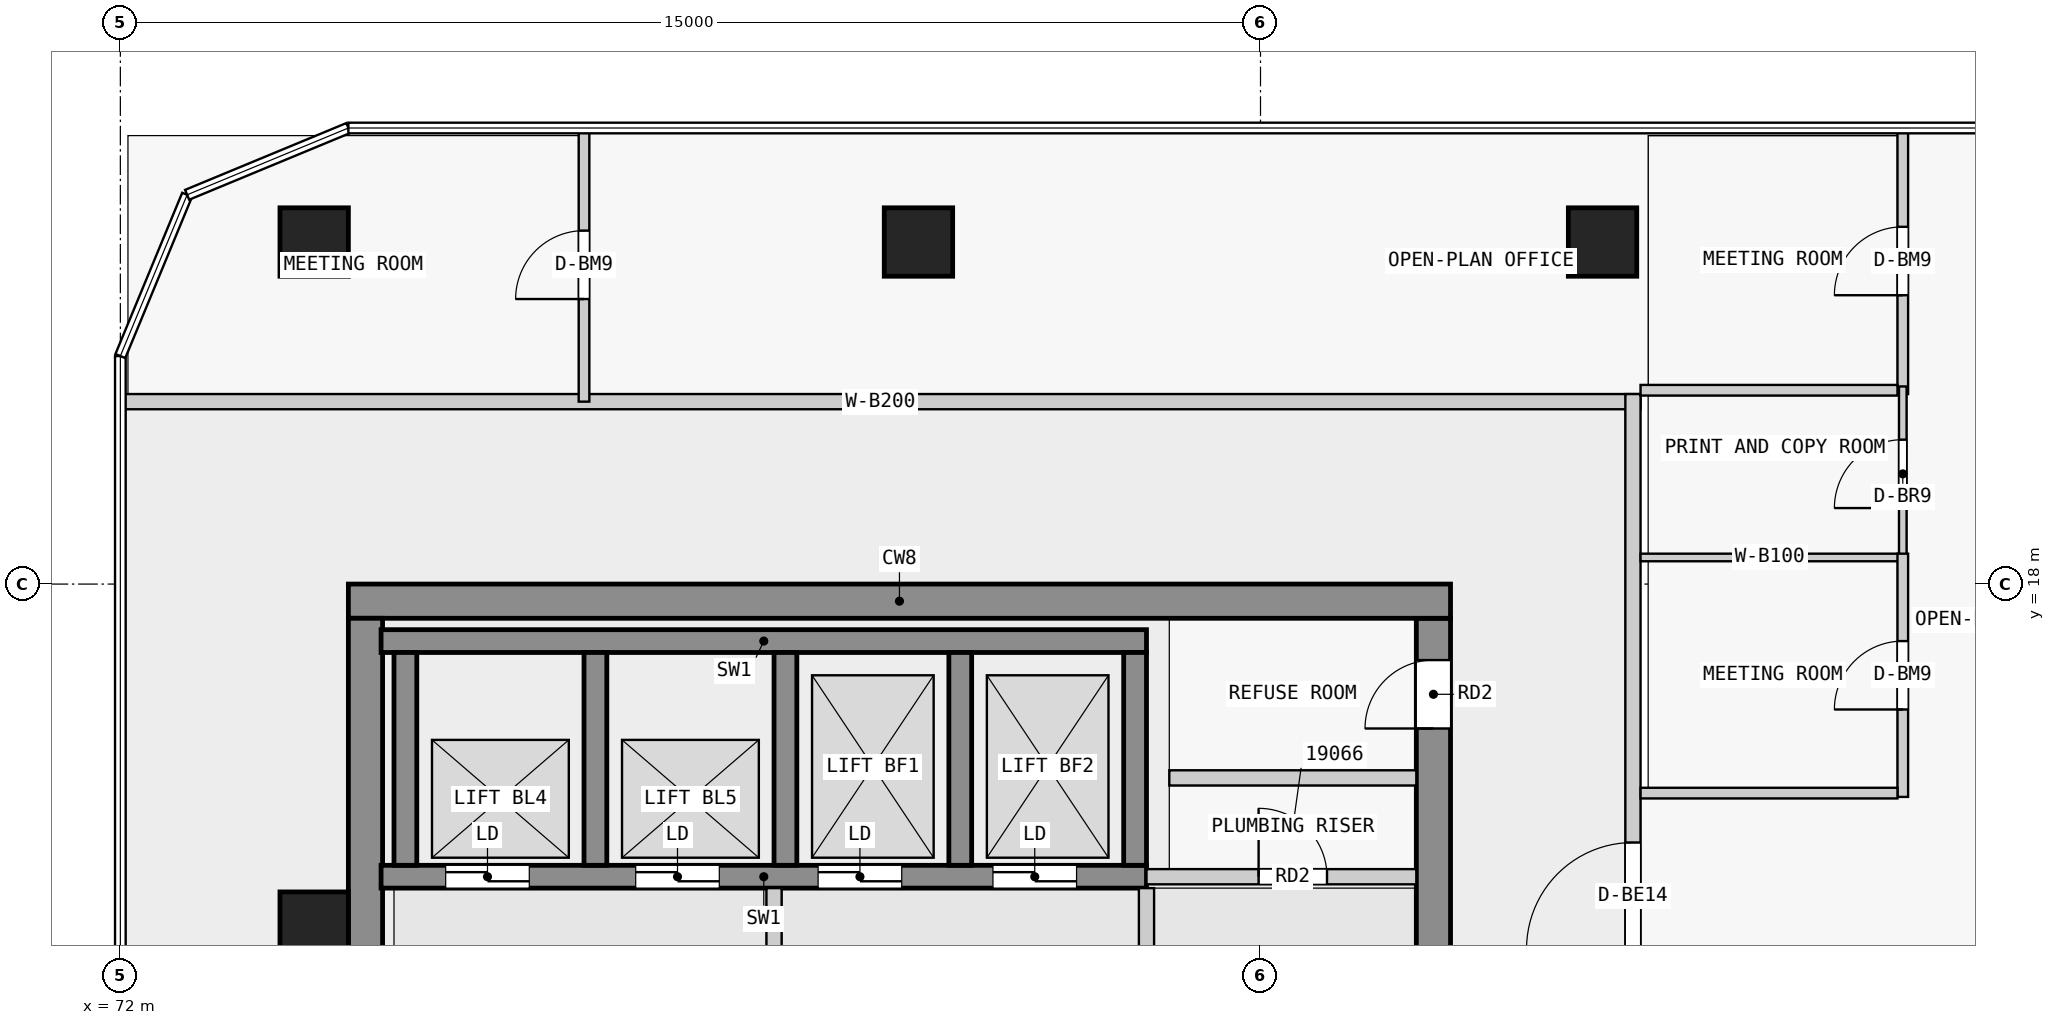
"""IFC4 building model, lengths in metres.
Left out: names, types, materials, properties, quantities, classifications, styles, units other than length and angle.
Written with IfcOpenShell. Run it as: python <this file> out.ifc"""

import sys

from ifc_helpers import new_model, si_unit, direction, frame, frame_2d, origin, origin_2d, place, context, subcontext, project, spatial, rectangle, extrude, element, fill, save


model = new_model("IFC4")
c1 = context("Model", 3, precision=1e-05, world=origin(), true_north=direction((0.0, 1.0)))
c2 = subcontext(c1, "Body", "Model", "MODEL_VIEW")
j1 = project(units=[si_unit("LENGTHUNIT", "METRE"), si_unit("PLANEANGLEUNIT", "RADIAN")], contexts=[c1])
p1 = place(None, origin())
s1 = spatial("IfcSite", under=j1, at=p1, CompositionType="ELEMENT")
p2 = place(p1, origin())
s2 = spatial("IfcBuilding", under=s1, at=p2, CompositionType="ELEMENT")
p3 = place(p2, frame((0.0, 0.0, 78.3)))
s3 = spatial("IfcBuildingStorey", under=s2, at=p3, CompositionType="ELEMENT", Elevation=78.3)
for number, where, z_axis, x_axis in (
    (1, (91.5, 22.5, 0.0), (0.0, 0.0, 1.0), (1.0, 0.0, 0.0)),
    (2, (82.5, 22.5, 0.0), (0.0, 0.0, 1.0), (1.0, 0.0, 0.0)),
    (3, (74.55, 22.5, 0.0), (0.0, 0.0, 1.0), (1.0, 0.0, 0.0)),
    (4, (74.55, 13.5, 0.0), (0.0, 0.0, 1.0), (1.0, 0.0, 0.0)),
):
    element("IfcColumn", number, at=place(p3, frame(where, z_axis=z_axis, x_axis=x_axis)), inside=s3, PredefinedType="COLUMN", context=c2, shape_type="SweptSolid", body=[
        extrude(rectangle(XDim=0.9, YDim=0.9, at=origin_2d()), origin(), (0.0, 0.0, 1.0), 3.5),
    ])
p4 = place(p3, frame((75.0, 17.775, 0.0), z_axis=(0.0, 0.0, 1.0), x_axis=(1.0, 0.0, 0.0)))
e5 = element("IfcWall", 5, at=p4, inside=s3, PredefinedType="SHEAR", context=c2, shape_type="SweptSolid", body=[
    extrude(rectangle(XDim=14.5, YDim=0.45, at=frame_2d((7.25, 0.0))), origin(), (0.0, 0.0, 1.0), 3.25),
])
p5 = place(p3, frame((75.225, 0.45, 0.0), z_axis=(0.0, 0.0, 1.0), x_axis=(0.0, 1.0, 0.0)))
e6 = element("IfcWall", 6, at=p5, inside=s3, PredefinedType="SHEAR", context=c2, shape_type="SweptSolid", body=[
    extrude(rectangle(XDim=17.1, YDim=0.45, at=frame_2d((8.55, 0.0))), origin(), (0.0, 0.0, 1.0), 3.25),
])
p6 = place(p5, frame((7.875, 0.0, 0.0)))
e7 = element("IfcOpeningElement", 7, at=p6, cuts=e6, PredefinedType="OPENING", context=c2, shape_type="SweptSolid", body=[
    extrude(rectangle(XDim=1.8, YDim=2.1, at=frame_2d((0.9, 1.05))), frame((0.0, 0.235, 0.0), z_axis=(0.0, -1.0, 0.0), x_axis=(1.0, 0.0, 0.0)), (0.0, 0.0, 1.0), 0.47),
])
p7 = place(p3, frame((89.275, 0.45, 0.0), z_axis=(0.0, 0.0, 1.0), x_axis=(0.0, 1.0, 0.0)))
e8 = element("IfcWall", 8, at=p7, inside=s3, PredefinedType="SHEAR", context=c2, shape_type="SweptSolid", body=[
    extrude(rectangle(XDim=17.1, YDim=0.45, at=frame_2d((8.55, 0.0))), origin(), (0.0, 0.0, 1.0), 3.25),
])
p8 = place(p7, frame((7.65, 0.0, 0.0)))
e9 = element("IfcOpeningElement", 9, at=p8, cuts=e8, PredefinedType="OPENING", context=c2, shape_type="SweptSolid", body=[
    extrude(rectangle(XDim=1.8, YDim=2.1, at=frame_2d((0.9, 1.05))), frame((0.0, 0.235, 0.0), z_axis=(0.0, -1.0, 0.0), x_axis=(1.0, 0.0, 0.0)), (0.0, 0.0, 1.0), 0.47),
])
p9 = place(p7, frame((15.65, 0.0, 0.0)))
e10 = element("IfcOpeningElement", 10, at=p9, cuts=e8, PredefinedType="OPENING", context=c2, shape_type="SweptSolid", body=[
    extrude(rectangle(XDim=0.9, YDim=2.1, at=frame_2d((0.45, 1.05))), frame((0.0, 0.235, 0.0), z_axis=(0.0, -1.0, 0.0), x_axis=(1.0, 0.0, 0.0)), (0.0, 0.0, 1.0), 0.47),
])
p10 = place(p3, frame((75.43, 17.25, 0.0), z_axis=(0.0, 0.0, 1.0), x_axis=(1.0, 0.0, 0.0)))
e11 = element("IfcWall", 11, at=p10, inside=s3, PredefinedType="SHEAR", context=c2, shape_type="SweptSolid", body=[
    extrude(rectangle(XDim=10.07, YDim=0.3, at=frame_2d((5.035, 0.0))), origin(), (0.0, 0.0, 1.0), 3.25),
])
p11 = place(p3, frame((75.43, 14.15, 0.0), z_axis=(0.0, 0.0, 1.0), x_axis=(1.0, 0.0, 0.0)))
e12 = element("IfcWall", 12, at=p11, inside=s3, PredefinedType="SHEAR", context=c2, shape_type="SweptSolid", body=[
    extrude(rectangle(XDim=10.07, YDim=0.3, at=frame_2d((5.035, 0.0))), origin(), (0.0, 0.0, 1.0), 3.25),
])
p12 = place(p11, frame((0.85, 0.0, 0.0)))
e13 = element("IfcOpeningElement", 13, at=p12, cuts=e12, PredefinedType="OPENING", context=c2, shape_type="SweptSolid", body=[
    extrude(rectangle(XDim=1.1, YDim=2.1, at=frame_2d((0.55, 1.05))), frame((0.0, 0.16, 0.0), z_axis=(0.0, -1.0, 0.0), x_axis=(1.0, 0.0, 0.0)), (0.0, 0.0, 1.0), 0.32),
])
p13 = place(p11, frame((3.35, 0.0, 0.0)))
e14 = element("IfcOpeningElement", 14, at=p13, cuts=e12, PredefinedType="OPENING", context=c2, shape_type="SweptSolid", body=[
    extrude(rectangle(XDim=1.1, YDim=2.1, at=frame_2d((0.55, 1.05))), frame((0.0, 0.16, 0.0), z_axis=(0.0, -1.0, 0.0), x_axis=(1.0, 0.0, 0.0)), (0.0, 0.0, 1.0), 0.32),
])
p14 = place(p11, frame((5.75, 0.0, 0.0)))
e15 = element("IfcOpeningElement", 15, at=p14, cuts=e12, PredefinedType="OPENING", context=c2, shape_type="SweptSolid", body=[
    extrude(rectangle(XDim=1.1, YDim=2.1, at=frame_2d((0.55, 1.05))), frame((0.0, 0.16, 0.0), z_axis=(0.0, -1.0, 0.0), x_axis=(1.0, 0.0, 0.0)), (0.0, 0.0, 1.0), 0.32),
])
p15 = place(p11, frame((8.05, 0.0, 0.0)))
e16 = element("IfcOpeningElement", 16, at=p15, cuts=e12, PredefinedType="OPENING", context=c2, shape_type="SweptSolid", body=[
    extrude(rectangle(XDim=1.1, YDim=2.1, at=frame_2d((0.55, 1.05))), frame((0.0, 0.16, 0.0), z_axis=(0.0, -1.0, 0.0), x_axis=(1.0, 0.0, 0.0)), (0.0, 0.0, 1.0), 0.32),
])
for number, where, z_axis, x_axis in (
    (17, (75.75, 14.3, 0.0), (0.0, 0.0, 1.0), (0.0, 1.0, 0.0)),
    (18, (78.25, 14.3, 0.0), (0.0, 0.0, 1.0), (0.0, 1.0, 0.0)),
    (19, (80.75, 14.3, 0.0), (0.0, 0.0, 1.0), (0.0, 1.0, 0.0)),
    (20, (83.05, 14.3, 0.0), (0.0, 0.0, 1.0), (0.0, 1.0, 0.0)),
    (21, (85.35, 14.3, 0.0), (0.0, 0.0, 1.0), (0.0, 1.0, 0.0)),
):
    element("IfcWall", number, at=place(p3, frame(where, z_axis=z_axis, x_axis=x_axis)), inside=s3, PredefinedType="SHEAR", context=c2, shape_type="SweptSolid", body=[
        extrude(rectangle(XDim=2.8, YDim=0.3, at=frame_2d((1.4, 0.0))), origin(), (0.0, 0.0, 1.0), 3.25),
    ])
for number, where, z_axis, x_axis in (
    (22, (80.6, 10.6, 0.0), (0.0, 0.0, 1.0), (0.0, 1.0, 0.0)),
    (23, (85.5, 10.6, 0.0), (0.0, 0.0, 1.0), (0.0, 1.0, 0.0)),
):
    element("IfcWall", number, at=place(p3, frame(where, z_axis=z_axis, x_axis=x_axis)), inside=s3, PredefinedType="PARTITIONING", context=c2, shape_type="SweptSolid", body=[
        extrude(rectangle(XDim=3.4, YDim=0.2, at=frame_2d((1.7, 0.0))), origin(), (0.0, 0.0, 1.0), 3.25),
    ])
p16 = place(p3, frame((85.5, 14.15, 0.0), z_axis=(0.0, 0.0, 1.0), x_axis=(1.0, 0.0, 0.0)))
e24 = element("IfcWall", 24, at=p16, inside=s3, PredefinedType="PARTITIONING", context=c2, shape_type="SweptSolid", body=[
    extrude(rectangle(XDim=3.55, YDim=0.2, at=frame_2d((1.775, 0.0))), origin(), (0.0, 0.0, 1.0), 3.25),
])
p17 = place(p16, frame((1.475, 0.0, 0.0)))
e25 = element("IfcOpeningElement", 25, at=p17, cuts=e24, PredefinedType="OPENING", context=c2, shape_type="SweptSolid", body=[
    extrude(rectangle(XDim=0.9, YDim=2.1, at=frame_2d((0.45, 1.05))), frame((0.0, 0.11, 0.0), z_axis=(0.0, -1.0, 0.0), x_axis=(1.0, 0.0, 0.0)), (0.0, 0.0, 1.0), 0.22),
])
p18 = place(p3, frame((85.8, 15.45, 0.0), z_axis=(0.0, 0.0, 1.0), x_axis=(1.0, 0.0, 0.0)))
e26 = element("IfcWall", 26, at=p18, inside=s3, PredefinedType="PARTITIONING", context=c2, shape_type="SweptSolid", body=[
    extrude(rectangle(XDim=3.25, YDim=0.2, at=frame_2d((1.625, 0.0))), origin(), (0.0, 0.0, 1.0), 3.25),
])
p19 = place(p3, frame((72.0, 20.4, 0.0), z_axis=(0.0, 0.0, 1.0), x_axis=(1.0, 0.0, 0.0)))
e27 = element("IfcWall", 27, at=p19, inside=s3, PredefinedType="PARTITIONING", context=c2, shape_type="SweptSolid", body=[
    extrude(rectangle(XDim=20.0, YDim=0.2, at=frame_2d((10.0, 0.0))), origin(), (0.0, 0.0, 1.0), 3.25),
])
p20 = place(p3, frame((91.9, 12.2, 0.0), z_axis=(0.0, 0.0, 1.0), x_axis=(0.0, 1.0, 0.0)))
e28 = element("IfcWall", 28, at=p20, inside=s3, PredefinedType="PARTITIONING", context=c2, shape_type="SweptSolid", body=[
    extrude(rectangle(XDim=8.3, YDim=0.2, at=frame_2d((4.15, 0.0))), origin(), (0.0, 0.0, 1.0), 3.25),
])
p21 = place(p20, frame((1.0, 0.0, 0.0)))
e29 = element("IfcOpeningElement", 29, at=p21, cuts=e28, PredefinedType="OPENING", context=c2, shape_type="SweptSolid", body=[
    extrude(rectangle(XDim=1.4, YDim=2.4, at=frame_2d((0.7, 1.2))), frame((0.0, 0.11, 0.0), z_axis=(0.0, -1.0, 0.0), x_axis=(1.0, 0.0, 0.0)), (0.0, 0.0, 1.0), 0.22),
])
p22 = place(p3, frame((95.45, 20.5, 0.0), z_axis=(0.0, 0.0, 1.0), x_axis=(0.0, 1.0, 0.0)))
e30 = element("IfcWall", 30, at=p22, inside=s3, PredefinedType="PARTITIONING", context=c2, shape_type="SweptSolid", body=[
    extrude(rectangle(XDim=3.5, YDim=0.14, at=frame_2d((1.75, 0.0))), origin(), (0.0, 0.0, 1.0), 3.25),
])
p23 = place(p22, frame((1.3, 0.0, 0.0)))
e31 = element("IfcOpeningElement", 31, at=p23, cuts=e30, PredefinedType="OPENING", context=c2, shape_type="SweptSolid", body=[
    extrude(rectangle(XDim=0.9, YDim=2.4, at=frame_2d((0.45, 1.2))), frame((0.0, 0.08, 0.0), z_axis=(0.0, -1.0, 0.0), x_axis=(1.0, 0.0, 0.0)), (0.0, 0.0, 1.0), 0.16),
])
p24 = place(p3, frame((92.0, 20.55, 0.0), z_axis=(0.0, 0.0, 1.0), x_axis=(1.0, 0.0, 0.0)))
e32 = element("IfcWall", 32, at=p24, inside=s3, PredefinedType="PARTITIONING", context=c2, shape_type="SweptSolid", body=[
    extrude(rectangle(XDim=3.38, YDim=0.14, at=frame_2d((1.69, 0.0))), origin(), (0.0, 0.0, 1.0), 3.25),
])
p25 = place(p3, frame((95.45, 18.3, 0.0), z_axis=(0.0, 0.0, 1.0), x_axis=(0.0, 1.0, 0.0)))
e33 = element("IfcWall", 33, at=p25, inside=s3, PredefinedType="PARTITIONING", context=c2, shape_type="SweptSolid", body=[
    extrude(rectangle(XDim=2.3, YDim=0.1, at=frame_2d((1.15, 0.0))), origin(), (0.0, 0.0, 1.0), 3.25),
])
p26 = place(p25, frame((0.7, 0.0, 0.0)))
e34 = element("IfcOpeningElement", 34, at=p26, cuts=e33, PredefinedType="OPENING", context=c2, shape_type="SweptSolid", body=[
    extrude(rectangle(XDim=0.9, YDim=2.1, at=frame_2d((0.45, 1.05))), frame((0.0, 0.06, 0.0), z_axis=(0.0, -1.0, 0.0), x_axis=(1.0, 0.0, 0.0)), (0.0, 0.0, 1.0), 0.12),
])
p27 = place(p3, frame((92.0, 18.35, 0.0), z_axis=(0.0, 0.0, 1.0), x_axis=(1.0, 0.0, 0.0)))
e35 = element("IfcWall", 35, at=p27, inside=s3, PredefinedType="PARTITIONING", context=c2, shape_type="SweptSolid", body=[
    extrude(rectangle(XDim=3.4, YDim=0.1, at=frame_2d((1.7, 0.0))), origin(), (0.0, 0.0, 1.0), 3.25),
])
p28 = place(p3, frame((95.45, 15.2, 0.0), z_axis=(0.0, 0.0, 1.0), x_axis=(0.0, 1.0, 0.0)))
e36 = element("IfcWall", 36, at=p28, inside=s3, PredefinedType="PARTITIONING", context=c2, shape_type="SweptSolid", body=[
    extrude(rectangle(XDim=3.2, YDim=0.14, at=frame_2d((1.6, 0.0))), origin(), (0.0, 0.0, 1.0), 3.25),
])
p29 = place(p28, frame((1.15, 0.0, 0.0)))
e37 = element("IfcOpeningElement", 37, at=p29, cuts=e36, PredefinedType="OPENING", context=c2, shape_type="SweptSolid", body=[
    extrude(rectangle(XDim=0.9, YDim=2.4, at=frame_2d((0.45, 1.2))), frame((0.0, 0.08, 0.0), z_axis=(0.0, -1.0, 0.0), x_axis=(1.0, 0.0, 0.0)), (0.0, 0.0, 1.0), 0.16),
])
p30 = place(p3, frame((92.0, 15.25, 0.0), z_axis=(0.0, 0.0, 1.0), x_axis=(1.0, 0.0, 0.0)))
e38 = element("IfcWall", 38, at=p30, inside=s3, PredefinedType="PARTITIONING", context=c2, shape_type="SweptSolid", body=[
    extrude(rectangle(XDim=3.38, YDim=0.14, at=frame_2d((1.69, 0.0))), origin(), (0.0, 0.0, 1.0), 3.25),
])
p31 = place(p3, frame((78.1, 20.4, 0.0), z_axis=(0.0, 0.0, 1.0), x_axis=(0.0, 1.0, 0.0)))
e39 = element("IfcWall", 39, at=p31, inside=s3, PredefinedType="PARTITIONING", context=c2, shape_type="SweptSolid", body=[
    extrude(rectangle(XDim=3.6, YDim=0.14, at=frame_2d((1.8, 0.0))), origin(), (0.0, 0.0, 1.0), 3.25),
])
p32 = place(p31, frame((1.35, 0.0, 0.0)))
e40 = element("IfcOpeningElement", 40, at=p32, cuts=e39, PredefinedType="OPENING", context=c2, shape_type="SweptSolid", body=[
    extrude(rectangle(XDim=0.9, YDim=2.4, at=frame_2d((0.45, 1.2))), frame((0.0, 0.08, 0.0), z_axis=(0.0, -1.0, 0.0), x_axis=(1.0, 0.0, 0.0)), (0.0, 0.0, 1.0), 0.16),
])
p33 = place(p12, origin())
e41 = element("IfcDoor", 41, at=p33, inside=s3, OperationType="DOUBLE_DOOR_SLIDING", PredefinedType="DOOR", context=c2, shape_type="SweptSolid", body=[
    extrude(rectangle(XDim=1.1, YDim=2.1, at=frame_2d((0.55, 1.05))), frame((0.0, 0.025, 0.0), z_axis=(0.0, -1.0, 0.0), x_axis=(1.0, 0.0, 0.0)), (0.0, 0.0, 1.0), 0.05),
])
fill(e13, e41)
p34 = place(p13, origin())
e42 = element("IfcDoor", 42, at=p34, inside=s3, OperationType="DOUBLE_DOOR_SLIDING", PredefinedType="DOOR", context=c2, shape_type="SweptSolid", body=[
    extrude(rectangle(XDim=1.1, YDim=2.1, at=frame_2d((0.55, 1.05))), frame((0.0, 0.025, 0.0), z_axis=(0.0, -1.0, 0.0), x_axis=(1.0, 0.0, 0.0)), (0.0, 0.0, 1.0), 0.05),
])
fill(e14, e42)
p35 = place(p14, origin())
e43 = element("IfcDoor", 43, at=p35, inside=s3, OperationType="DOUBLE_DOOR_SLIDING", PredefinedType="DOOR", context=c2, shape_type="SweptSolid", body=[
    extrude(rectangle(XDim=1.1, YDim=2.1, at=frame_2d((0.55, 1.05))), frame((0.0, 0.025, 0.0), z_axis=(0.0, -1.0, 0.0), x_axis=(1.0, 0.0, 0.0)), (0.0, 0.0, 1.0), 0.05),
])
fill(e15, e43)
p36 = place(p15, origin())
e44 = element("IfcDoor", 44, at=p36, inside=s3, OperationType="DOUBLE_DOOR_SLIDING", PredefinedType="DOOR", context=c2, shape_type="SweptSolid", body=[
    extrude(rectangle(XDim=1.1, YDim=2.1, at=frame_2d((0.55, 1.05))), frame((0.0, 0.025, 0.0), z_axis=(0.0, -1.0, 0.0), x_axis=(1.0, 0.0, 0.0)), (0.0, 0.0, 1.0), 0.05),
])
fill(e16, e44)
p37 = place(p17, origin())
e45 = element("IfcDoor", 45, at=p37, inside=s3, OperationType="SINGLE_SWING_LEFT", PredefinedType="DOOR", context=c2, shape_type="SweptSolid", body=[
    extrude(rectangle(XDim=0.9, YDim=2.1, at=frame_2d((0.45, 1.05))), frame((0.0, 0.025, 0.0), z_axis=(0.0, -1.0, 0.0), x_axis=(1.0, 0.0, 0.0)), (0.0, 0.0, 1.0), 0.05),
])
fill(e25, e45)
p38 = place(p9, origin())
e46 = element("IfcDoor", 46, at=p38, inside=s3, OperationType="SINGLE_SWING_LEFT", PredefinedType="DOOR", context=c2, shape_type="SweptSolid", body=[
    extrude(rectangle(XDim=0.9, YDim=2.1, at=frame_2d((0.45, 1.05))), frame((0.0, 0.025, 0.0), z_axis=(0.0, -1.0, 0.0), x_axis=(1.0, 0.0, 0.0)), (0.0, 0.0, 1.0), 0.05),
])
fill(e10, e46)
p39 = place(p21, origin())
e47 = element("IfcDoor", 47, at=p39, inside=s3, OperationType="DOUBLE_DOOR_SINGLE_SWING", PredefinedType="DOOR", context=c2, shape_type="SweptSolid", body=[
    extrude(rectangle(XDim=1.4, YDim=2.4, at=frame_2d((0.7, 1.2))), frame((0.0, 0.025, 0.0), z_axis=(0.0, -1.0, 0.0), x_axis=(1.0, 0.0, 0.0)), (0.0, 0.0, 1.0), 0.05),
])
fill(e29, e47)
p40 = place(p23, origin())
e48 = element("IfcDoor", 48, at=p40, inside=s3, OperationType="SINGLE_SWING_LEFT", PredefinedType="DOOR", context=c2, shape_type="SweptSolid", body=[
    extrude(rectangle(XDim=0.9, YDim=2.4, at=frame_2d((0.45, 1.2))), frame((0.0, 0.025, 0.0), z_axis=(0.0, -1.0, 0.0), x_axis=(1.0, 0.0, 0.0)), (0.0, 0.0, 1.0), 0.05),
])
fill(e31, e48)
p41 = place(p26, origin())
e49 = element("IfcDoor", 49, at=p41, inside=s3, OperationType="SINGLE_SWING_LEFT", PredefinedType="DOOR", context=c2, shape_type="SweptSolid", body=[
    extrude(rectangle(XDim=0.9, YDim=2.1, at=frame_2d((0.45, 1.05))), frame((0.0, 0.025, 0.0), z_axis=(0.0, -1.0, 0.0), x_axis=(1.0, 0.0, 0.0)), (0.0, 0.0, 1.0), 0.05),
])
fill(e34, e49)
p42 = place(p29, origin())
e50 = element("IfcDoor", 50, at=p42, inside=s3, OperationType="SINGLE_SWING_LEFT", PredefinedType="DOOR", context=c2, shape_type="SweptSolid", body=[
    extrude(rectangle(XDim=0.9, YDim=2.4, at=frame_2d((0.45, 1.2))), frame((0.0, 0.025, 0.0), z_axis=(0.0, -1.0, 0.0), x_axis=(1.0, 0.0, 0.0)), (0.0, 0.0, 1.0), 0.05),
])
fill(e37, e50)
p43 = place(p32, origin())
e51 = element("IfcDoor", 51, at=p43, inside=s3, OperationType="SINGLE_SWING_LEFT", PredefinedType="DOOR", context=c2, shape_type="SweptSolid", body=[
    extrude(rectangle(XDim=0.9, YDim=2.4, at=frame_2d((0.45, 1.2))), frame((0.0, 0.025, 0.0), z_axis=(0.0, -1.0, 0.0), x_axis=(1.0, 0.0, 0.0)), (0.0, 0.0, 1.0), 0.05),
])
fill(e40, e51)
save(model, sys.argv[1])
